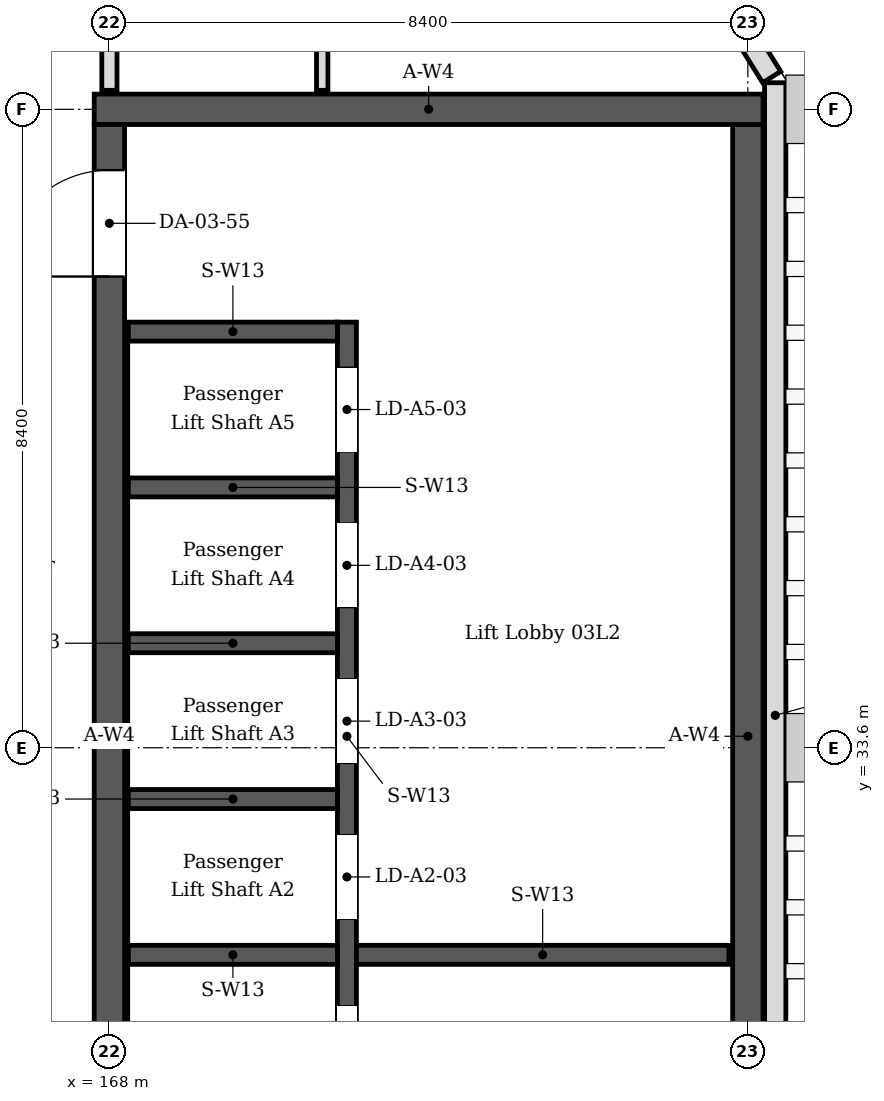
"""IFC4 building model, lengths in metres.
Left out: names, types, materials, properties, quantities, classifications, styles, units other than length and angle.
Written with IfcOpenShell. Run it as: python <this file> out.ifc"""

import sys

from ifc_helpers import new_model, si_unit, direction, frame, frame_2d, origin, place, context, subcontext, project, spatial, rectangle, extrude, element, fill, save


model = new_model("IFC4")
c1 = context("Model", 3, precision=1e-05, world=origin(), true_north=direction((0.0, 1.0)))
c2 = subcontext(c1, "Body", "Model", "MODEL_VIEW")
j1 = project(units=[si_unit("LENGTHUNIT", "METRE"), si_unit("PLANEANGLEUNIT", "RADIAN")], contexts=[c1])
p1 = place(None, origin())
s1 = spatial("IfcSite", under=j1, at=p1, CompositionType="ELEMENT")
p2 = place(p1, origin())
s2 = spatial("IfcBuilding", under=s1, at=p2, CompositionType="ELEMENT")
p3 = place(p2, frame((0.0, 0.0, 14.4)))
s3 = spatial("IfcBuildingStorey", under=s2, at=p3, CompositionType="ELEMENT", Elevation=14.4)
p4 = place(p3, frame((167.8, 42.0, 0.0), z_axis=(0.0, 0.0, 1.0), x_axis=(1.0, 0.0, 0.0)))
e1 = element("IfcWall", 1, at=p4, inside=s3, PredefinedType="SOLIDWALL", context=c2, shape_type="SweptSolid", body=[
    extrude(rectangle(XDim=8.8, YDim=0.4, at=frame_2d((4.4, 0.0))), origin(), (0.0, 0.0, 1.0), 4.05),
])
p5 = place(p3, frame((168.0, 25.4, 0.0), z_axis=(0.0, 0.0, 1.0), x_axis=(0.0, 1.0, 0.0)))
e2 = element("IfcWall", 2, at=p5, inside=s3, PredefinedType="SOLIDWALL", context=c2, shape_type="SweptSolid", body=[
    extrude(rectangle(XDim=16.4, YDim=0.4, at=frame_2d((8.2, 0.0))), origin(), (0.0, 0.0, 1.0), 4.05),
])
p6 = place(p5, frame((1.0, 0.0, 0.0)))
e3 = element("IfcOpeningElement", 3, at=p6, cuts=e2, PredefinedType="OPENING", context=c2, shape_type="SweptSolid", body=[
    extrude(rectangle(XDim=1.0, YDim=2.1, at=frame_2d((0.5, 1.05))), frame((0.0, 0.21, 0.0), z_axis=(0.0, -1.0, 0.0), x_axis=(1.0, 0.0, 0.0)), (0.0, 0.0, 1.0), 0.42),
])
p7 = place(p5, frame((14.4, 0.0, 0.0)))
e4 = element("IfcOpeningElement", 4, at=p7, cuts=e2, PredefinedType="OPENING", context=c2, shape_type="SweptSolid", body=[
    extrude(rectangle(XDim=1.4, YDim=2.1, at=frame_2d((0.7, 1.05))), frame((0.0, 0.21, 0.0), z_axis=(0.0, -1.0, 0.0), x_axis=(1.0, 0.0, 0.0)), (0.0, 0.0, 1.0), 0.42),
])
p8 = place(p3, frame((176.4, 25.4, 0.0), z_axis=(0.0, 0.0, 1.0), x_axis=(0.0, 1.0, 0.0)))
e5 = element("IfcWall", 5, at=p8, inside=s3, PredefinedType="SOLIDWALL", context=c2, shape_type="SweptSolid", body=[
    extrude(rectangle(XDim=16.4, YDim=0.4, at=frame_2d((8.2, 0.0))), origin(), (0.0, 0.0, 1.0), 4.05),
])
p9 = place(p3, frame((176.76, -0.22, 0.0), z_axis=(0.0, 0.0, 1.0), x_axis=(0.0, 1.0, 0.0)))
e6 = element("IfcWall", 6, at=p9, inside=s3, PredefinedType="SOLIDWALL", context=c2, shape_type="SweptSolid", body=[
    extrude(rectangle(XDim=42.57, YDim=0.28, at=frame_2d((21.285, 0.0))), origin(), (0.0, 0.0, 1.0), 4.05),
])
p10 = place(p9, frame((9.46, 0.0, 0.6)))
e7 = element("IfcOpeningElement", 7, at=p10, cuts=e6, PredefinedType="OPENING", context=c2, shape_type="SweptSolid", body=[
    extrude(rectangle(XDim=2.52, YDim=2.4, at=frame_2d((1.26, 1.2))), frame((0.0, 0.15, 0.0), z_axis=(0.0, -1.0, 0.0), x_axis=(1.0, 0.0, 0.0)), (0.0, 0.0, 1.0), 0.3),
])
p11 = place(p9, frame((13.66, 0.0, 0.6)))
e8 = element("IfcOpeningElement", 8, at=p11, cuts=e6, PredefinedType="OPENING", context=c2, shape_type="SweptSolid", body=[
    extrude(rectangle(XDim=2.52, YDim=2.4, at=frame_2d((1.26, 1.2))), frame((0.0, 0.15, 0.0), z_axis=(0.0, -1.0, 0.0), x_axis=(1.0, 0.0, 0.0)), (0.0, 0.0, 1.0), 0.3),
])
p12 = place(p9, frame((17.44, 0.0, 0.6)))
e9 = element("IfcOpeningElement", 9, at=p12, cuts=e6, PredefinedType="OPENING", context=c2, shape_type="SweptSolid", body=[
    extrude(rectangle(XDim=2.52, YDim=2.4, at=frame_2d((1.26, 1.2))), frame((0.0, 0.15, 0.0), z_axis=(0.0, -1.0, 0.0), x_axis=(1.0, 0.0, 0.0)), (0.0, 0.0, 1.0), 0.3),
])
p13 = place(p9, frame((21.64, 0.0, 0.6)))
e10 = element("IfcOpeningElement", 10, at=p13, cuts=e6, PredefinedType="OPENING", context=c2, shape_type="SweptSolid", body=[
    extrude(rectangle(XDim=2.52, YDim=2.4, at=frame_2d((1.26, 1.2))), frame((0.0, 0.15, 0.0), z_axis=(0.0, -1.0, 0.0), x_axis=(1.0, 0.0, 0.0)), (0.0, 0.0, 1.0), 0.3),
])
p14 = place(p3, frame((176.714, 42.424, 0.0), z_axis=(0.0, 0.0, 1.0), x_axis=(-0.529018946142, 0.848610013271, 0.0)))
e11 = element("IfcWall", 11, at=p14, inside=s3, PredefinedType="SOLIDWALL", context=c2, shape_type="SweptSolid", body=[
    extrude(rectangle(XDim=4.144, YDim=0.28, at=frame_2d((2.072, 0.0))), origin(), (0.0, 0.0, 1.0), 4.05),
])
p15 = place(p14, frame((0.812, 0.0, 0.6)))
e12 = element("IfcOpeningElement", 12, at=p15, cuts=e11, PredefinedType="OPENING", context=c2, shape_type="SweptSolid", body=[
    extrude(rectangle(XDim=2.52, YDim=2.4, at=frame_2d((1.26, 1.2))), frame((0.0, 0.15, 0.0), z_axis=(0.0, -1.0, 0.0), x_axis=(1.0, 0.0, 0.0)), (0.0, 0.0, 1.0), 0.3),
])
p16 = place(p3, frame((170.8, 42.25, 0.0), z_axis=(0.0, 0.0, 1.0), x_axis=(0.0, 1.0, 0.0)))
e13 = element("IfcWall", 13, at=p16, inside=s3, PredefinedType="PARTITIONING", context=c2, shape_type="SweptSolid", body=[
    extrude(rectangle(XDim=2.15, YDim=0.15, at=frame_2d((1.075, 0.0))), origin(), (0.0, 0.0, 1.0), 4.05),
])
p17 = place(p3, frame((168.0, 42.25, 0.0), z_axis=(0.0, 0.0, 1.0), x_axis=(0.0, 1.0, 0.0)))
e14 = element("IfcWall", 14, at=p17, inside=s3, PredefinedType="PARTITIONING", context=c2, shape_type="SweptSolid", body=[
    extrude(rectangle(XDim=7.943, YDim=0.2, at=frame_2d((3.972, 0.0))), origin(), (0.0, 0.0, 1.0), 3.45),
])
p18 = place(p17, frame((2.45, 0.0, 0.0)))
e15 = element("IfcOpeningElement", 15, at=p18, cuts=e14, PredefinedType="OPENING", context=c2, shape_type="SweptSolid", body=[
    extrude(rectangle(XDim=1.2, YDim=2.1, at=frame_2d((0.6, 1.05))), frame((0.0, 0.11, 0.0), z_axis=(0.0, -1.0, 0.0), x_axis=(1.0, 0.0, 0.0)), (0.0, 0.0, 1.0), 0.22),
])
p19 = place(p17, frame((4.25, 0.0, 0.0)))
e16 = element("IfcOpeningElement", 16, at=p19, cuts=e14, PredefinedType="OPENING", context=c2, shape_type="SweptSolid", body=[
    extrude(rectangle(XDim=1.2, YDim=2.1, at=frame_2d((0.6, 1.05))), frame((0.0, 0.11, 0.0), z_axis=(0.0, -1.0, 0.0), x_axis=(1.0, 0.0, 0.0)), (0.0, 0.0, 1.0), 0.22),
])
p20 = place(p3, frame((171.125, 28.3, 0.0), z_axis=(0.0, 0.0, 1.0), x_axis=(0.0, 1.0, 0.0)))
e17 = element("IfcWall", 17, at=p20, inside=s3, PredefinedType="SOLIDWALL", context=c2, shape_type="SweptSolid", body=[
    extrude(rectangle(XDim=10.9, YDim=0.25, at=frame_2d((5.45, 0.0))), origin(), (0.0, 0.0, 1.0), 4.05),
])
p21 = place(p20, frame((0.8, 0.0, 0.0)))
e18 = element("IfcOpeningElement", 18, at=p21, cuts=e17, PredefinedType="OPENING", context=c2, shape_type="SweptSolid", body=[
    extrude(rectangle(XDim=1.1, YDim=2.1, at=frame_2d((0.55, 1.05))), frame((0.0, 0.135, 0.0), z_axis=(0.0, -1.0, 0.0), x_axis=(1.0, 0.0, 0.0)), (0.0, 0.0, 1.0), 0.27),
])
p22 = place(p20, frame((3.05, 0.0, 0.0)))
e19 = element("IfcOpeningElement", 19, at=p22, cuts=e17, PredefinedType="OPENING", context=c2, shape_type="SweptSolid", body=[
    extrude(rectangle(XDim=1.1, YDim=2.1, at=frame_2d((0.55, 1.05))), frame((0.0, 0.135, 0.0), z_axis=(0.0, -1.0, 0.0), x_axis=(1.0, 0.0, 0.0)), (0.0, 0.0, 1.0), 0.27),
])
p23 = place(p20, frame((5.1, 0.0, 0.0)))
e20 = element("IfcOpeningElement", 20, at=p23, cuts=e17, PredefinedType="OPENING", context=c2, shape_type="SweptSolid", body=[
    extrude(rectangle(XDim=1.1, YDim=2.1, at=frame_2d((0.55, 1.05))), frame((0.0, 0.135, 0.0), z_axis=(0.0, -1.0, 0.0), x_axis=(1.0, 0.0, 0.0)), (0.0, 0.0, 1.0), 0.27),
])
p24 = place(p20, frame((7.15, 0.0, 0.0)))
e21 = element("IfcOpeningElement", 21, at=p24, cuts=e17, PredefinedType="OPENING", context=c2, shape_type="SweptSolid", body=[
    extrude(rectangle(XDim=1.1, YDim=2.1, at=frame_2d((0.55, 1.05))), frame((0.0, 0.135, 0.0), z_axis=(0.0, -1.0, 0.0), x_axis=(1.0, 0.0, 0.0)), (0.0, 0.0, 1.0), 0.27),
])
p25 = place(p20, frame((9.2, 0.0, 0.0)))
e22 = element("IfcOpeningElement", 22, at=p25, cuts=e17, PredefinedType="OPENING", context=c2, shape_type="SweptSolid", body=[
    extrude(rectangle(XDim=1.1, YDim=2.1, at=frame_2d((0.55, 1.05))), frame((0.0, 0.135, 0.0), z_axis=(0.0, -1.0, 0.0), x_axis=(1.0, 0.0, 0.0)), (0.0, 0.0, 1.0), 0.27),
])
for number, where, z_axis, x_axis in (
    (23, (168.25, 30.875, 0.0), (0.0, 0.0, 1.0), (1.0, 0.0, 0.0)),
    (24, (168.25, 32.925, 0.0), (0.0, 0.0, 1.0), (1.0, 0.0, 0.0)),
    (25, (168.25, 34.975, 0.0), (0.0, 0.0, 1.0), (1.0, 0.0, 0.0)),
    (26, (168.25, 37.025, 0.0), (0.0, 0.0, 1.0), (1.0, 0.0, 0.0)),
    (27, (168.25, 39.075, 0.0), (0.0, 0.0, 1.0), (1.0, 0.0, 0.0)),
):
    element("IfcWall", number, at=place(p3, frame(where, z_axis=z_axis, x_axis=x_axis)), inside=s3, PredefinedType="SOLIDWALL", context=c2, shape_type="SweptSolid", body=[
        extrude(rectangle(XDim=2.75, YDim=0.25, at=frame_2d((1.375, 0.0))), origin(), (0.0, 0.0, 1.0), 4.05),
    ])
p26 = place(p3, frame((171.25, 30.875, 0.0), z_axis=(0.0, 0.0, 1.0), x_axis=(1.0, 0.0, 0.0)))
e28 = element("IfcWall", 28, at=p26, inside=s3, PredefinedType="SOLIDWALL", context=c2, shape_type="SweptSolid", body=[
    extrude(rectangle(XDim=4.9, YDim=0.25, at=frame_2d((2.45, 0.0))), origin(), (0.0, 0.0, 1.0), 4.05),
])
p27 = place(p21, origin())
e29 = element("IfcDoor", 29, at=p27, inside=s3, OperationType="SLIDING_TO_LEFT", PredefinedType="DOOR", context=c2, shape_type="SweptSolid", body=[
    extrude(rectangle(XDim=1.1, YDim=2.1, at=frame_2d((0.55, 1.05))), frame((0.0, 0.025, 0.0), z_axis=(0.0, -1.0, 0.0), x_axis=(1.0, 0.0, 0.0)), (0.0, 0.0, 1.0), 0.05),
])
fill(e18, e29)
p28 = place(p22, origin())
e30 = element("IfcDoor", 30, at=p28, inside=s3, OperationType="SLIDING_TO_LEFT", PredefinedType="DOOR", context=c2, shape_type="SweptSolid", body=[
    extrude(rectangle(XDim=1.1, YDim=2.1, at=frame_2d((0.55, 1.05))), frame((0.0, 0.025, 0.0), z_axis=(0.0, -1.0, 0.0), x_axis=(1.0, 0.0, 0.0)), (0.0, 0.0, 1.0), 0.05),
])
fill(e19, e30)
p29 = place(p23, origin())
e31 = element("IfcDoor", 31, at=p29, inside=s3, OperationType="SLIDING_TO_LEFT", PredefinedType="DOOR", context=c2, shape_type="SweptSolid", body=[
    extrude(rectangle(XDim=1.1, YDim=2.1, at=frame_2d((0.55, 1.05))), frame((0.0, 0.025, 0.0), z_axis=(0.0, -1.0, 0.0), x_axis=(1.0, 0.0, 0.0)), (0.0, 0.0, 1.0), 0.05),
])
fill(e20, e31)
p30 = place(p24, origin())
e32 = element("IfcDoor", 32, at=p30, inside=s3, OperationType="SLIDING_TO_LEFT", PredefinedType="DOOR", context=c2, shape_type="SweptSolid", body=[
    extrude(rectangle(XDim=1.1, YDim=2.1, at=frame_2d((0.55, 1.05))), frame((0.0, 0.025, 0.0), z_axis=(0.0, -1.0, 0.0), x_axis=(1.0, 0.0, 0.0)), (0.0, 0.0, 1.0), 0.05),
])
fill(e21, e32)
p31 = place(p25, origin())
e33 = element("IfcDoor", 33, at=p31, inside=s3, OperationType="SLIDING_TO_LEFT", PredefinedType="DOOR", context=c2, shape_type="SweptSolid", body=[
    extrude(rectangle(XDim=1.1, YDim=2.1, at=frame_2d((0.55, 1.05))), frame((0.0, 0.025, 0.0), z_axis=(0.0, -1.0, 0.0), x_axis=(1.0, 0.0, 0.0)), (0.0, 0.0, 1.0), 0.05),
])
fill(e22, e33)
p32 = place(p7, origin())
e34 = element("IfcDoor", 34, at=p32, inside=s3, OperationType="DOUBLE_DOOR_DOUBLE_SWING", PredefinedType="DOOR", context=c2, shape_type="SweptSolid", body=[
    extrude(rectangle(XDim=1.4, YDim=2.1, at=frame_2d((0.7, 1.05))), frame((0.0, 0.025, 0.0), z_axis=(0.0, -1.0, 0.0), x_axis=(1.0, 0.0, 0.0)), (0.0, 0.0, 1.0), 0.05),
])
fill(e4, e34)
save(model, sys.argv[1])
